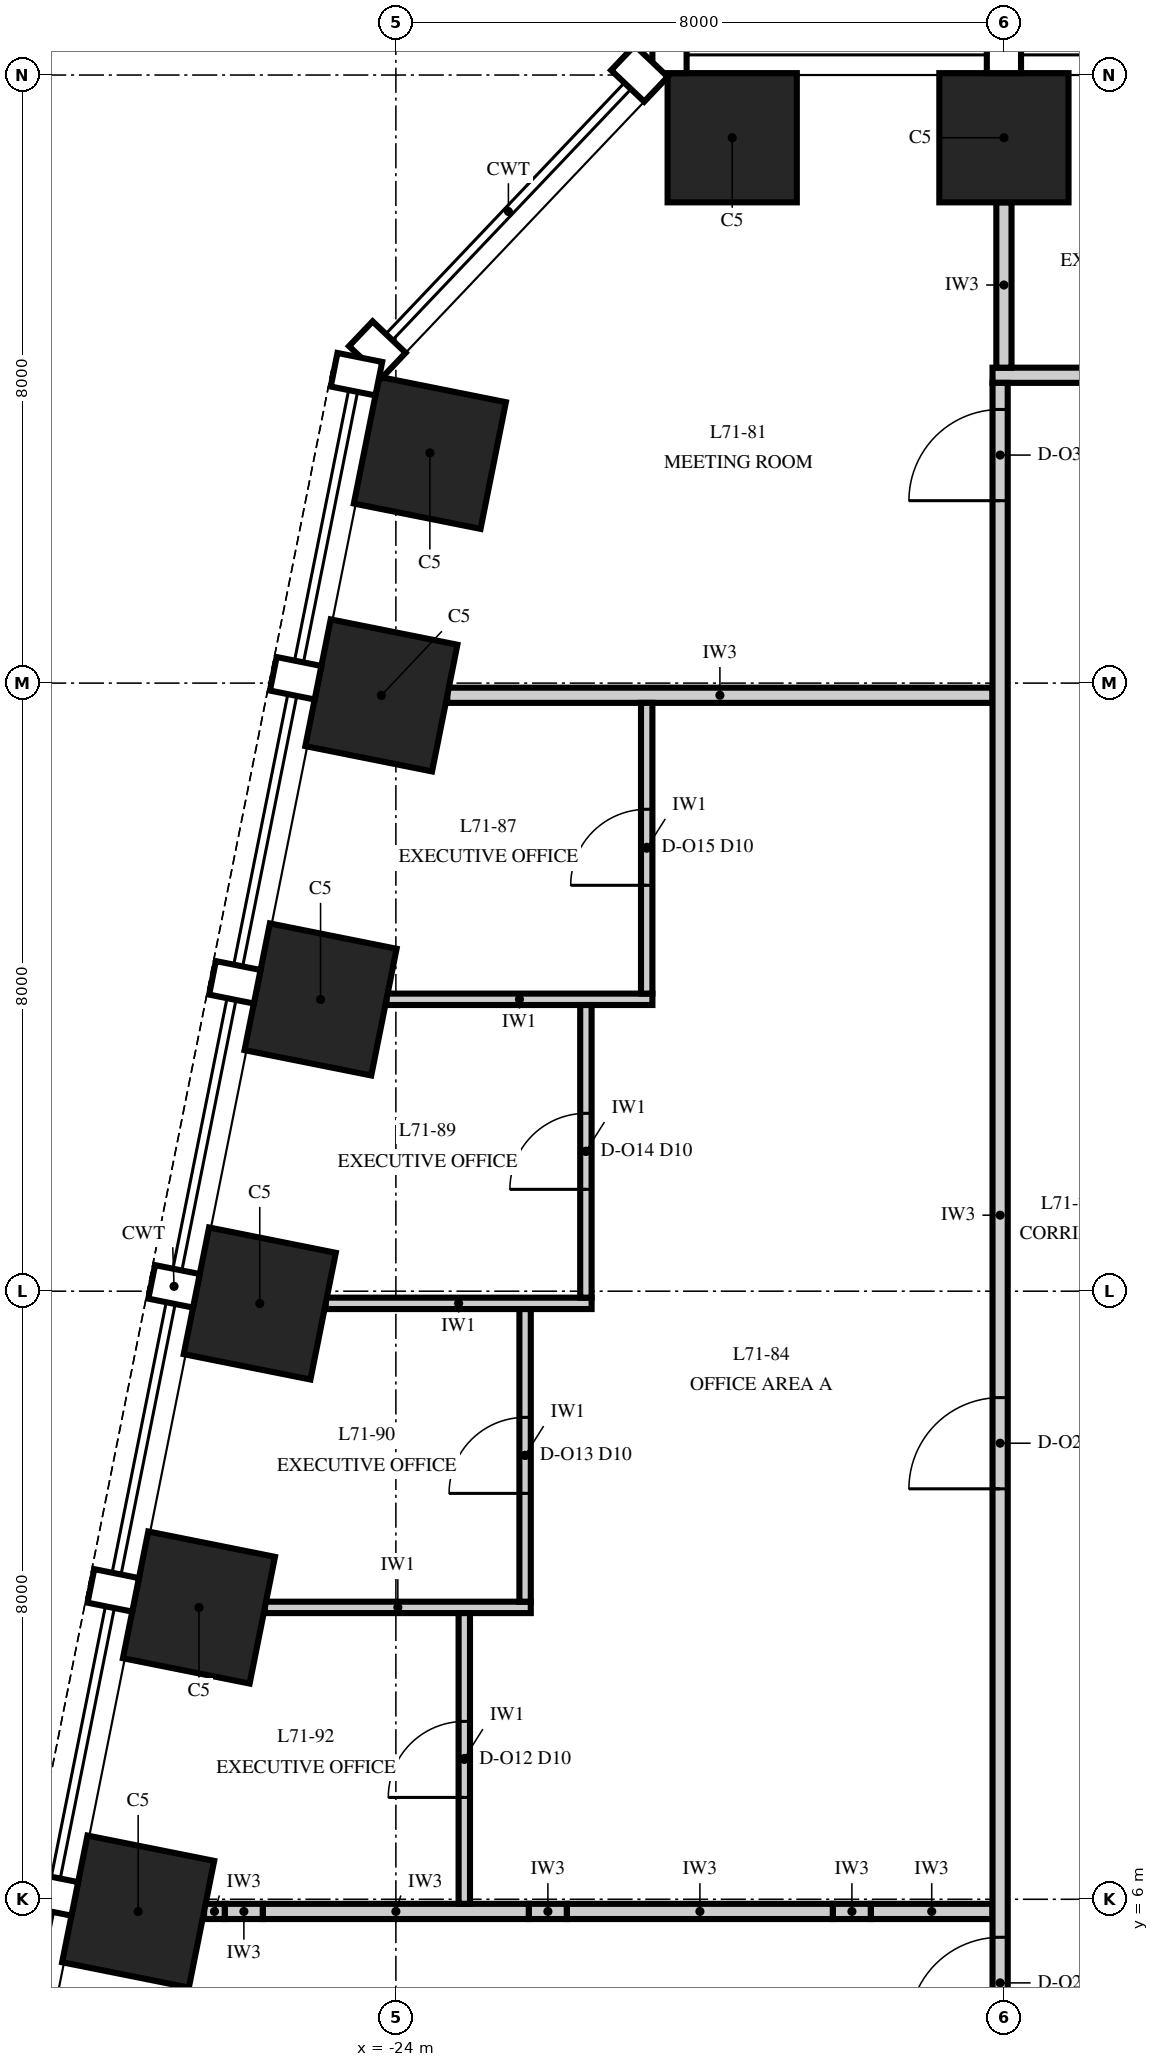
"""IFC4 building model, lengths in metres.
Left out: names, types, materials, properties, quantities, classifications, styles, units other than length and angle.
Written with IfcOpenShell. Run it as: python <this file> out.ifc"""

import sys

from ifc_helpers import new_model, si_unit, direction, frame, frame_2d, origin, origin_2d, place, context, subcontext, project, spatial, rectangle, extrude, element, fill, save


model = new_model("IFC4")
c1 = context("Model", 3, precision=1e-05, world=origin(), true_north=direction((0.0, 1.0)))
c2 = subcontext(c1, "Body", "Model", "MODEL_VIEW")
j1 = project(units=[si_unit("LENGTHUNIT", "METRE"), si_unit("PLANEANGLEUNIT", "RADIAN")], contexts=[c1])
p1 = place(None, origin())
s1 = spatial("IfcSite", under=j1, at=p1, CompositionType="ELEMENT")
p2 = place(p1, origin())
s2 = spatial("IfcBuilding", under=s1, at=p2, CompositionType="ELEMENT")
p3 = place(p2, frame((0.0, 0.0, 304.0)))
s3 = spatial("IfcBuildingStorey", under=s2, at=p3, CompositionType="ELEMENT", Elevation=304.0)
for number, where, z_axis, x_axis in (
    (1, (-16.0, 29.175, 0.0), (0.0, 0.0, 1.0), (-1.0, 0.0, 0.0)),
    (2, (-19.575, 29.175, 0.0), (0.0, 0.0, 1.0), (-1.0, 0.0, 0.0)),
    (3, (-23.553, 25.029, 0.0), (0.0, 0.0, 1.0), (-0.196, -0.981, 0.0)),
    (4, (-24.191, 21.838, 0.0), (0.0, 0.0, 1.0), (-0.196, -0.981, 0.0)),
    (5, (-24.991, 17.838, 0.0), (0.0, 0.0, 1.0), (-0.196, -0.981, 0.0)),
    (6, (-25.791, 13.838, 0.0), (0.0, 0.0, 1.0), (-0.196, -0.981, 0.0)),
    (7, (-26.591, 9.838, 0.0), (0.0, 0.0, 1.0), (-0.196, -0.981, 0.0)),
    (8, (-27.391, 5.838, 0.0), (0.0, 0.0, 1.0), (-0.196, -0.981, 0.0)),
):
    element("IfcColumn", number, at=place(p3, frame(where, z_axis=z_axis, x_axis=x_axis)), inside=s3, PredefinedType="COLUMN", context=c2, shape_type="SweptSolid", body=[
        extrude(rectangle(XDim=1.7, YDim=1.7, at=origin_2d()), origin(), (0.0, 0.0, 1.0), 4.0),
    ])
p4 = place(p3, frame((-26.524, 5.84, 0.0), z_axis=(0.0, 0.0, 1.0), x_axis=(1.0, 0.0, 0.0)))
e9 = element("IfcWall", 9, at=p4, inside=s3, PredefinedType="PARTITIONING", context=c2, shape_type="SweptSolid", body=[
    extrude(rectangle(XDim=0.274, YDim=0.2, at=frame_2d((0.137, 0.0))), origin(), (0.0, 0.0, 1.0), 2.842),
])
p5 = place(p3, frame((-26.25, 5.84, 0.0), z_axis=(0.0, 0.0, 1.0), x_axis=(1.0, 0.0, 0.0)))
e10 = element("IfcWall", 10, at=p5, inside=s3, PredefinedType="PARTITIONING", context=c2, shape_type="SweptSolid", body=[
    extrude(rectangle(XDim=0.5, YDim=0.2, at=frame_2d((0.25, 0.0))), origin(), (0.0, 0.0, 1.0), 2.15),
])
p6 = place(p3, frame((-25.75, 5.84, 0.0), z_axis=(0.0, 0.0, 1.0), x_axis=(1.0, 0.0, 0.0)))
e11 = element("IfcWall", 11, at=p6, inside=s3, PredefinedType="PARTITIONING", context=c2, shape_type="SweptSolid", body=[
    extrude(rectangle(XDim=3.5, YDim=0.2, at=frame_2d((1.75, 0.0))), origin(), (0.0, 0.0, 1.0), 2.842),
])
p7 = place(p3, frame((-22.25, 5.84, 0.0), z_axis=(0.0, 0.0, 1.0), x_axis=(1.0, 0.0, 0.0)))
e12 = element("IfcWall", 12, at=p7, inside=s3, PredefinedType="PARTITIONING", context=c2, shape_type="SweptSolid", body=[
    extrude(rectangle(XDim=0.5, YDim=0.2, at=frame_2d((0.25, 0.0))), origin(), (0.0, 0.0, 1.0), 2.15),
])
p8 = place(p3, frame((-21.75, 5.84, 0.0), z_axis=(0.0, 0.0, 1.0), x_axis=(1.0, 0.0, 0.0)))
e13 = element("IfcWall", 13, at=p8, inside=s3, PredefinedType="PARTITIONING", context=c2, shape_type="SweptSolid", body=[
    extrude(rectangle(XDim=3.5, YDim=0.2, at=frame_2d((1.75, 0.0))), origin(), (0.0, 0.0, 1.0), 2.842),
])
p9 = place(p3, frame((-18.25, 5.84, 0.0), z_axis=(0.0, 0.0, 1.0), x_axis=(1.0, 0.0, 0.0)))
e14 = element("IfcWall", 14, at=p9, inside=s3, PredefinedType="PARTITIONING", context=c2, shape_type="SweptSolid", body=[
    extrude(rectangle(XDim=0.5, YDim=0.2, at=frame_2d((0.25, 0.0))), origin(), (0.0, 0.0, 1.0), 2.15),
])
p10 = place(p3, frame((-17.75, 5.84, 0.0), z_axis=(0.0, 0.0, 1.0), x_axis=(1.0, 0.0, 0.0)))
e15 = element("IfcWall", 15, at=p10, inside=s3, PredefinedType="PARTITIONING", context=c2, shape_type="SweptSolid", body=[
    extrude(rectangle(XDim=1.6, YDim=0.2, at=frame_2d((0.8, 0.0))), origin(), (0.0, 0.0, 1.0), 2.842),
])
for number, where, z_axis, x_axis in (
    (16, (-25.724, 9.84, 0.0), (0.0, 0.0, 1.0), (1.0, 0.0, 0.0)),
    (17, (-24.924, 13.84, 0.0), (0.0, 0.0, 1.0), (1.0, 0.0, 0.0)),
    (18, (-24.124, 17.84, 0.0), (0.0, 0.0, 1.0), (1.0, 0.0, 0.0)),
):
    element("IfcWall", number, at=place(p3, frame(where, z_axis=z_axis, x_axis=x_axis)), inside=s3, PredefinedType="PARTITIONING", context=c2, shape_type="SweptSolid", body=[
        extrude(rectangle(XDim=3.499, YDim=0.15, at=frame_2d((1.75, 0.0))), origin(), (0.0, 0.0, 1.0), 3.23),
    ])
p11 = place(p3, frame((-23.324, 21.84, 0.0), z_axis=(0.0, 0.0, 1.0), x_axis=(1.0, 0.0, 0.0)))
e19 = element("IfcWall", 19, at=p11, inside=s3, PredefinedType="PARTITIONING", context=c2, shape_type="SweptSolid", body=[
    extrude(rectangle(XDim=7.174, YDim=0.2, at=frame_2d((3.587, 0.0))), origin(), (0.0, 0.0, 1.0), 3.23),
])
p12 = place(p3, frame((-16.15, 26.05, 0.0), z_axis=(0.0, 0.0, 1.0), x_axis=(1.0, 0.0, 0.0)))
e20 = element("IfcWall", 20, at=p12, inside=s3, PredefinedType="PARTITIONING", context=c2, shape_type="SweptSolid", body=[
    extrude(rectangle(XDim=32.3, YDim=0.2, at=frame_2d((16.15, 0.0))), origin(), (0.0, 0.0, 1.0), 3.418),
])
p13 = place(p12, frame((1.55, 0.0, 0.0)))
e21 = element("IfcOpeningElement", 21, at=p13, cuts=e20, PredefinedType="OPENING", context=c2, shape_type="SweptSolid", body=[
    extrude(rectangle(XDim=1.2, YDim=2.4, at=frame_2d((0.6, 1.2))), frame((0.0, 0.115, 0.0), z_axis=(0.0, -1.0, 0.0), x_axis=(1.0, 0.0, 0.0)), (0.0, 0.0, 1.0), 0.23),
])
p14 = place(p12, frame((5.55, 0.0, 0.0)))
e22 = element("IfcOpeningElement", 22, at=p14, cuts=e20, PredefinedType="OPENING", context=c2, shape_type="SweptSolid", body=[
    extrude(rectangle(XDim=1.2, YDim=2.4, at=frame_2d((0.6, 1.2))), frame((0.0, 0.115, 0.0), z_axis=(0.0, -1.0, 0.0), x_axis=(1.0, 0.0, 0.0)), (0.0, 0.0, 1.0), 0.23),
])
p15 = place(p12, frame((9.55, 0.0, 0.0)))
e23 = element("IfcOpeningElement", 23, at=p15, cuts=e20, PredefinedType="OPENING", context=c2, shape_type="SweptSolid", body=[
    extrude(rectangle(XDim=1.2, YDim=2.4, at=frame_2d((0.6, 1.2))), frame((0.0, 0.115, 0.0), z_axis=(0.0, -1.0, 0.0), x_axis=(1.0, 0.0, 0.0)), (0.0, 0.0, 1.0), 0.23),
])
p16 = place(p12, frame((13.55, 0.0, 0.0)))
e24 = element("IfcOpeningElement", 24, at=p16, cuts=e20, PredefinedType="OPENING", context=c2, shape_type="SweptSolid", body=[
    extrude(rectangle(XDim=1.2, YDim=2.4, at=frame_2d((0.6, 1.2))), frame((0.0, 0.115, 0.0), z_axis=(0.0, -1.0, 0.0), x_axis=(1.0, 0.0, 0.0)), (0.0, 0.0, 1.0), 0.23),
])
p17 = place(p12, frame((17.55, 0.0, 0.0)))
e25 = element("IfcOpeningElement", 25, at=p17, cuts=e20, PredefinedType="OPENING", context=c2, shape_type="SweptSolid", body=[
    extrude(rectangle(XDim=1.2, YDim=2.4, at=frame_2d((0.6, 1.2))), frame((0.0, 0.115, 0.0), z_axis=(0.0, -1.0, 0.0), x_axis=(1.0, 0.0, 0.0)), (0.0, 0.0, 1.0), 0.23),
])
p18 = place(p12, frame((21.55, 0.0, 0.0)))
e26 = element("IfcOpeningElement", 26, at=p18, cuts=e20, PredefinedType="OPENING", context=c2, shape_type="SweptSolid", body=[
    extrude(rectangle(XDim=1.2, YDim=2.4, at=frame_2d((0.6, 1.2))), frame((0.0, 0.115, 0.0), z_axis=(0.0, -1.0, 0.0), x_axis=(1.0, 0.0, 0.0)), (0.0, 0.0, 1.0), 0.23),
])
p19 = place(p12, frame((25.55, 0.0, 0.0)))
e27 = element("IfcOpeningElement", 27, at=p19, cuts=e20, PredefinedType="OPENING", context=c2, shape_type="SweptSolid", body=[
    extrude(rectangle(XDim=1.2, YDim=2.4, at=frame_2d((0.6, 1.2))), frame((0.0, 0.115, 0.0), z_axis=(0.0, -1.0, 0.0), x_axis=(1.0, 0.0, 0.0)), (0.0, 0.0, 1.0), 0.23),
])
p20 = place(p12, frame((29.55, 0.0, 0.0)))
e28 = element("IfcOpeningElement", 28, at=p20, cuts=e20, PredefinedType="OPENING", context=c2, shape_type="SweptSolid", body=[
    extrude(rectangle(XDim=1.2, YDim=2.4, at=frame_2d((0.6, 1.2))), frame((0.0, 0.115, 0.0), z_axis=(0.0, -1.0, 0.0), x_axis=(1.0, 0.0, 0.0)), (0.0, 0.0, 1.0), 0.23),
])
p21 = place(p3, frame((-23.1, 5.94, 0.0), z_axis=(0.0, 0.0, 1.0), x_axis=(0.0, 1.0, 0.0)))
e29 = element("IfcWall", 29, at=p21, inside=s3, PredefinedType="PARTITIONING", context=c2, shape_type="SweptSolid", body=[
    extrude(rectangle(XDim=3.825, YDim=0.15, at=frame_2d((1.913, 0.0))), origin(), (0.0, 0.0, 1.0), 2.842),
])
p22 = place(p21, frame((1.4, 0.0, 0.0)))
e30 = element("IfcOpeningElement", 30, at=p22, cuts=e29, PredefinedType="OPENING", context=c2, shape_type="SweptSolid", body=[
    extrude(rectangle(XDim=1.0, YDim=2.3, at=frame_2d((0.5, 1.15))), frame((0.0, 0.09, 0.0), z_axis=(0.0, -1.0, 0.0), x_axis=(1.0, 0.0, 0.0)), (0.0, 0.0, 1.0), 0.18),
])
p23 = place(p3, frame((-22.3, 9.915, 0.0), z_axis=(0.0, 0.0, 1.0), x_axis=(0.0, 1.0, 0.0)))
e31 = element("IfcWall", 31, at=p23, inside=s3, PredefinedType="PARTITIONING", context=c2, shape_type="SweptSolid", body=[
    extrude(rectangle(XDim=3.85, YDim=0.15, at=frame_2d((1.925, 0.0))), origin(), (0.0, 0.0, 1.0), 3.85),
])
p24 = place(p23, frame((1.425, 0.0, 0.0)))
e32 = element("IfcOpeningElement", 32, at=p24, cuts=e31, PredefinedType="OPENING", context=c2, shape_type="SweptSolid", body=[
    extrude(rectangle(XDim=1.0, YDim=2.3, at=frame_2d((0.5, 1.15))), frame((0.0, 0.09, 0.0), z_axis=(0.0, -1.0, 0.0), x_axis=(1.0, 0.0, 0.0)), (0.0, 0.0, 1.0), 0.18),
])
p25 = place(p3, frame((-21.5, 13.915, 0.0), z_axis=(0.0, 0.0, 1.0), x_axis=(0.0, 1.0, 0.0)))
e33 = element("IfcWall", 33, at=p25, inside=s3, PredefinedType="PARTITIONING", context=c2, shape_type="SweptSolid", body=[
    extrude(rectangle(XDim=3.85, YDim=0.15, at=frame_2d((1.925, 0.0))), origin(), (0.0, 0.0, 1.0), 3.23),
])
p26 = place(p25, frame((1.425, 0.0, 0.0)))
e34 = element("IfcOpeningElement", 34, at=p26, cuts=e33, PredefinedType="OPENING", context=c2, shape_type="SweptSolid", body=[
    extrude(rectangle(XDim=1.0, YDim=2.3, at=frame_2d((0.5, 1.15))), frame((0.0, 0.09, 0.0), z_axis=(0.0, -1.0, 0.0), x_axis=(1.0, 0.0, 0.0)), (0.0, 0.0, 1.0), 0.18),
])
p27 = place(p3, frame((-20.7, 17.915, 0.0), z_axis=(0.0, 0.0, 1.0), x_axis=(0.0, 1.0, 0.0)))
e35 = element("IfcWall", 35, at=p27, inside=s3, PredefinedType="PARTITIONING", context=c2, shape_type="SweptSolid", body=[
    extrude(rectangle(XDim=3.825, YDim=0.15, at=frame_2d((1.913, 0.0))), origin(), (0.0, 0.0, 1.0), 3.23),
])
p28 = place(p27, frame((1.425, 0.0, 0.0)))
e36 = element("IfcOpeningElement", 36, at=p28, cuts=e35, PredefinedType="OPENING", context=c2, shape_type="SweptSolid", body=[
    extrude(rectangle(XDim=1.0, YDim=2.3, at=frame_2d((0.5, 1.15))), frame((0.0, 0.09, 0.0), z_axis=(0.0, -1.0, 0.0), x_axis=(1.0, 0.0, 0.0)), (0.0, 0.0, 1.0), 0.18),
])
p29 = place(p3, frame((-16.05, 4.05, 0.0), z_axis=(0.0, 0.0, 1.0), x_axis=(0.0, 1.0, 0.0)))
e37 = element("IfcWall", 37, at=p29, inside=s3, PredefinedType="PARTITIONING", context=c2, shape_type="SweptSolid", body=[
    extrude(rectangle(XDim=21.9, YDim=0.2, at=frame_2d((10.95, 0.0))), origin(), (0.0, 0.0, 1.0), 2.842),
])
p30 = place(p29, frame((0.25, 0.0, 0.0)))
e38 = element("IfcOpeningElement", 38, at=p30, cuts=e37, PredefinedType="OPENING", context=c2, shape_type="SweptSolid", body=[
    extrude(rectangle(XDim=1.2, YDim=2.4, at=frame_2d((0.6, 1.2))), frame((0.0, 0.115, 0.0), z_axis=(0.0, -1.0, 0.0), x_axis=(1.0, 0.0, 0.0)), (0.0, 0.0, 1.0), 0.23),
])
p31 = place(p29, frame((7.35, 0.0, 0.0)))
e39 = element("IfcOpeningElement", 39, at=p31, cuts=e37, PredefinedType="OPENING", context=c2, shape_type="SweptSolid", body=[
    extrude(rectangle(XDim=1.2, YDim=2.4, at=frame_2d((0.6, 1.2))), frame((0.0, 0.115, 0.0), z_axis=(0.0, -1.0, 0.0), x_axis=(1.0, 0.0, 0.0)), (0.0, 0.0, 1.0), 0.23),
])
p32 = place(p29, frame((20.35, 0.0, 0.0)))
e40 = element("IfcOpeningElement", 40, at=p32, cuts=e37, PredefinedType="OPENING", context=c2, shape_type="SweptSolid", body=[
    extrude(rectangle(XDim=1.2, YDim=2.4, at=frame_2d((0.6, 1.2))), frame((0.0, 0.115, 0.0), z_axis=(0.0, -1.0, 0.0), x_axis=(1.0, 0.0, 0.0)), (0.0, 0.0, 1.0), 0.23),
])
p33 = place(p3, frame((-16.0, 26.15, 0.0), z_axis=(0.0, 0.0, 1.0), x_axis=(0.0, 1.0, 0.0)))
e41 = element("IfcWall", 41, at=p33, inside=s3, PredefinedType="PARTITIONING", context=c2, shape_type="SweptSolid", body=[
    extrude(rectangle(XDim=2.175, YDim=0.2, at=frame_2d((1.087, 0.0))), origin(), (0.0, 0.0, 1.0), 3.418),
])
p34 = place(p22, origin())
e42 = element("IfcDoor", 42, at=p34, inside=s3, OperationType="SINGLE_SWING_LEFT", PredefinedType="DOOR", context=c2, shape_type="SweptSolid", body=[
    extrude(rectangle(XDim=1.0, YDim=2.3, at=frame_2d((0.5, 1.15))), frame((0.0, 0.075, 0.0), z_axis=(0.0, -1.0, 0.0), x_axis=(1.0, 0.0, 0.0)), (0.0, 0.0, 1.0), 0.149),
])
fill(e30, e42)
p35 = place(p24, origin())
e43 = element("IfcDoor", 43, at=p35, inside=s3, OperationType="SINGLE_SWING_LEFT", PredefinedType="DOOR", context=c2, shape_type="SweptSolid", body=[
    extrude(rectangle(XDim=1.0, YDim=2.3, at=frame_2d((0.5, 1.15))), frame((0.0, 0.075, 0.0), z_axis=(0.0, -1.0, 0.0), x_axis=(1.0, 0.0, 0.0)), (0.0, 0.0, 1.0), 0.149),
])
fill(e32, e43)
p36 = place(p26, origin())
e44 = element("IfcDoor", 44, at=p36, inside=s3, OperationType="SINGLE_SWING_LEFT", PredefinedType="DOOR", context=c2, shape_type="SweptSolid", body=[
    extrude(rectangle(XDim=1.0, YDim=2.3, at=frame_2d((0.5, 1.15))), frame((0.0, 0.075, 0.0), z_axis=(0.0, -1.0, 0.0), x_axis=(1.0, 0.0, 0.0)), (0.0, 0.0, 1.0), 0.149),
])
fill(e34, e44)
p37 = place(p28, origin())
e45 = element("IfcDoor", 45, at=p37, inside=s3, OperationType="SINGLE_SWING_LEFT", PredefinedType="DOOR", context=c2, shape_type="SweptSolid", body=[
    extrude(rectangle(XDim=1.0, YDim=2.3, at=frame_2d((0.5, 1.15))), frame((0.0, 0.075, 0.0), z_axis=(0.0, -1.0, 0.0), x_axis=(1.0, 0.0, 0.0)), (0.0, 0.0, 1.0), 0.149),
])
fill(e36, e45)
p38 = place(p30, origin())
e46 = element("IfcDoor", 46, at=p38, inside=s3, OperationType="SINGLE_SWING_LEFT", PredefinedType="DOOR", context=c2, shape_type="SweptSolid", body=[
    extrude(rectangle(XDim=1.2, YDim=2.4, at=frame_2d((0.6, 1.2))), frame((0.0, 0.1, 0.0), z_axis=(0.0, -1.0, 0.0), x_axis=(1.0, 0.0, 0.0)), (0.0, 0.0, 1.0), 0.199),
])
fill(e38, e46)
p39 = place(p31, origin())
e47 = element("IfcDoor", 47, at=p39, inside=s3, OperationType="SINGLE_SWING_LEFT", PredefinedType="DOOR", context=c2, shape_type="SweptSolid", body=[
    extrude(rectangle(XDim=1.2, YDim=2.4, at=frame_2d((0.6, 1.2))), frame((0.0, 0.1, 0.0), z_axis=(0.0, -1.0, 0.0), x_axis=(1.0, 0.0, 0.0)), (0.0, 0.0, 1.0), 0.199),
])
fill(e39, e47)
p40 = place(p32, origin())
e48 = element("IfcDoor", 48, at=p40, inside=s3, OperationType="SINGLE_SWING_LEFT", PredefinedType="DOOR", context=c2, shape_type="SweptSolid", body=[
    extrude(rectangle(XDim=1.2, YDim=2.4, at=frame_2d((0.6, 1.2))), frame((0.0, 0.1, 0.0), z_axis=(0.0, -1.0, 0.0), x_axis=(1.0, 0.0, 0.0)), (0.0, 0.0, 1.0), 0.199),
])
fill(e40, e48)
save(model, sys.argv[1])
